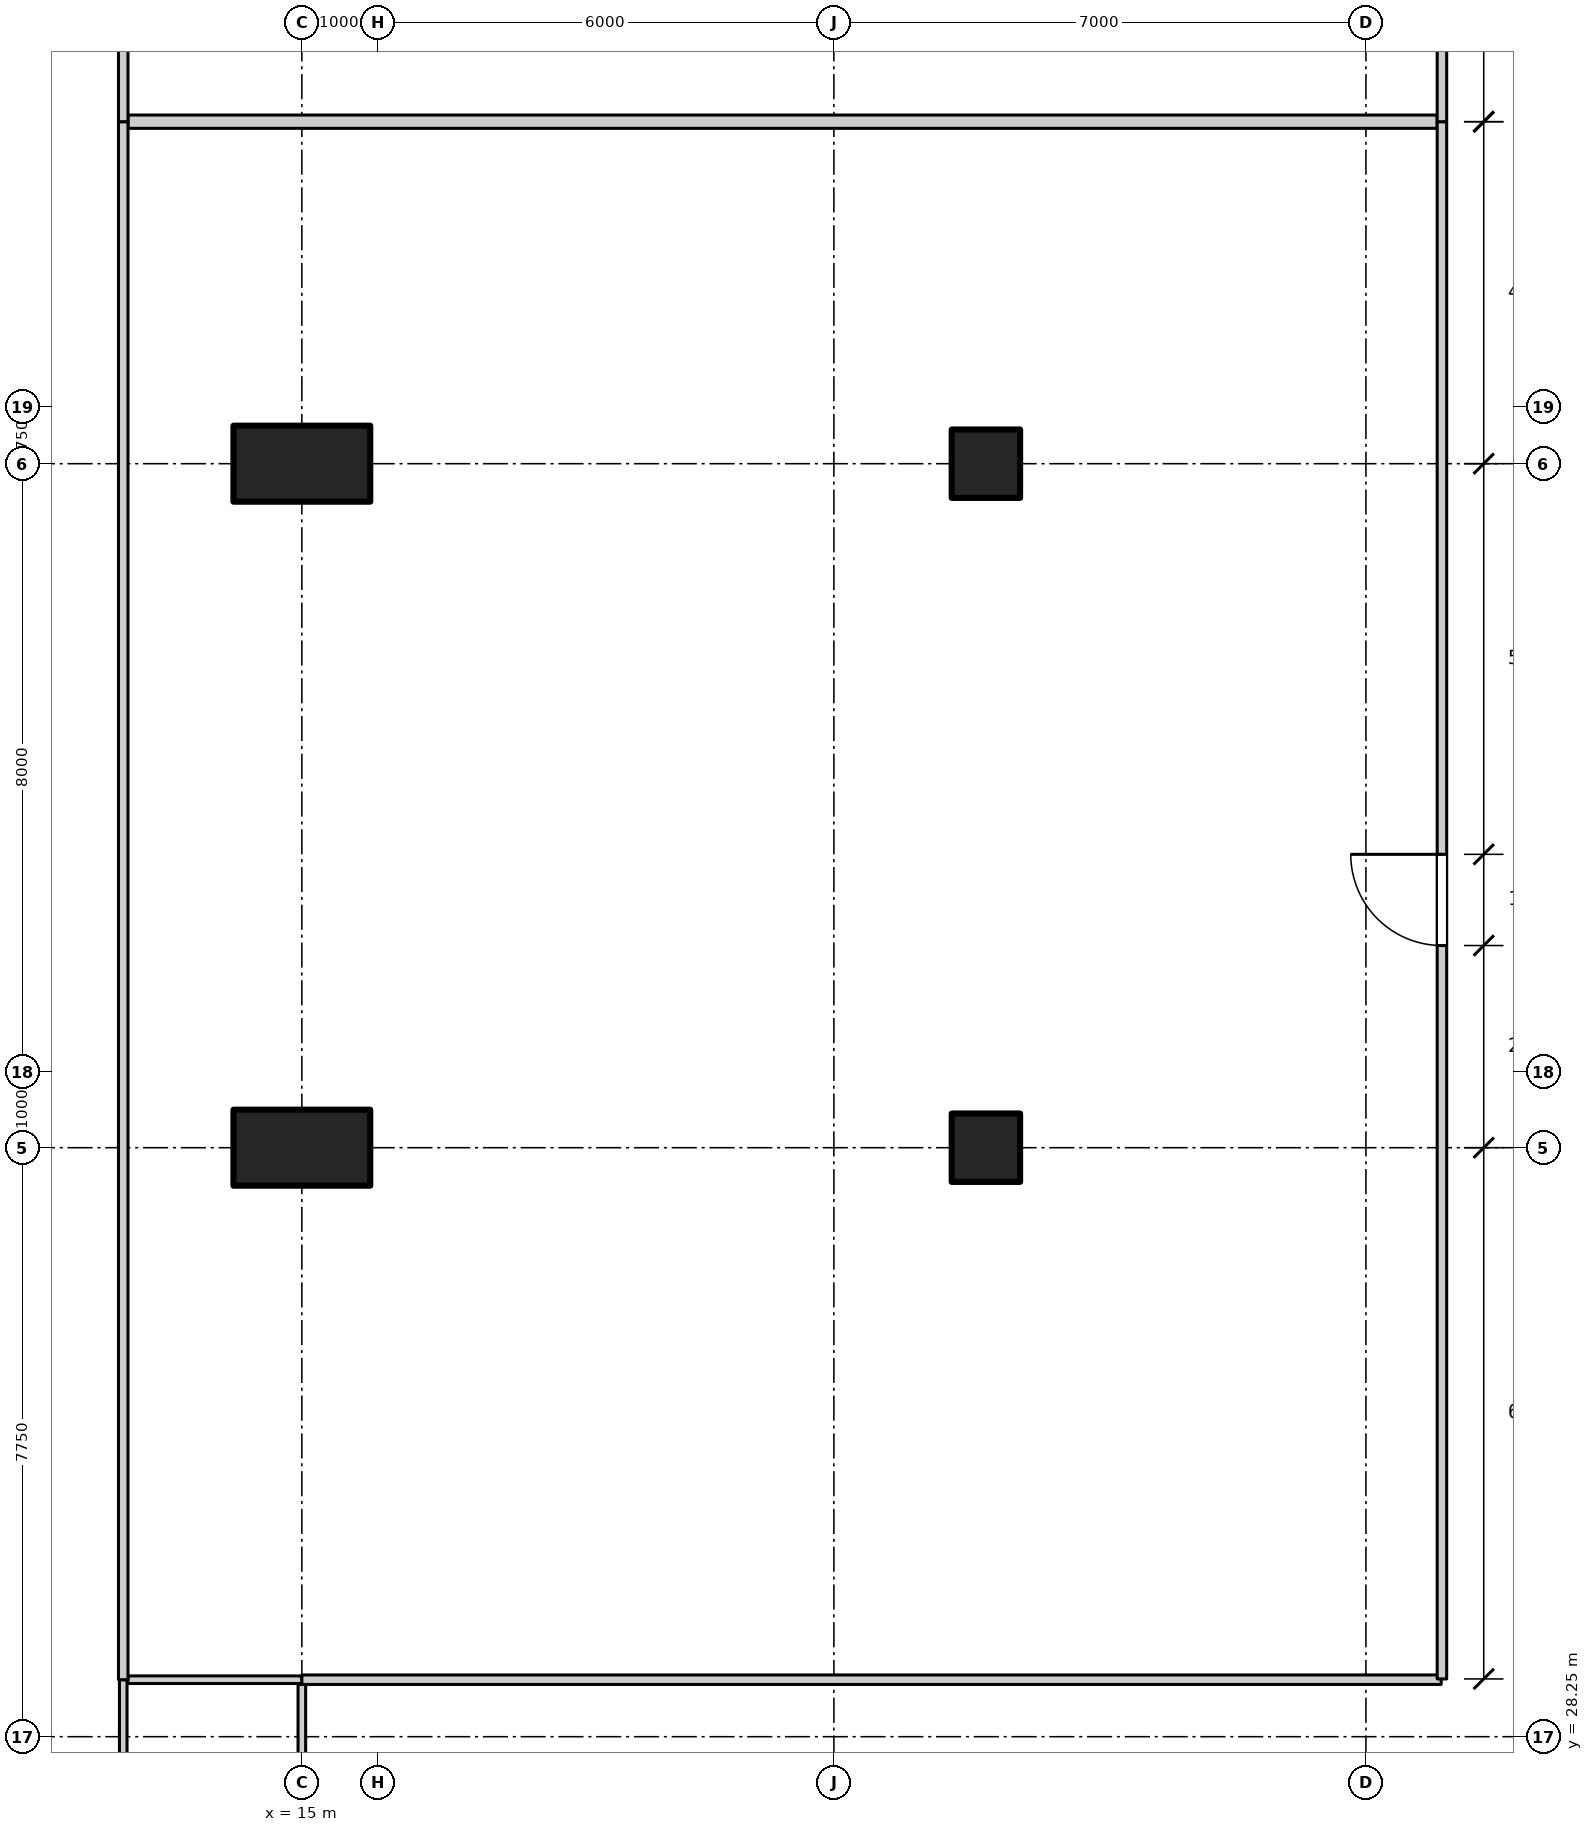
"""IFC4 building model, lengths in metres.
Left out: names, types, materials, properties, quantities, classifications, styles, units other than length and angle.
Written with IfcOpenShell. Run it as: python <this file> out.ifc"""

import sys

from ifc_helpers import new_model, si_unit, direction, frame, frame_2d, origin, origin_2d, place, context, subcontext, project, spatial, rectangle, extrude, element, fill, save


model = new_model("IFC4")
c1 = context("Model", 3, precision=1e-05, world=origin(), true_north=direction((0.0, 1.0)))
c2 = subcontext(c1, "Body", "Model", "MODEL_VIEW")
j1 = project(units=[si_unit("LENGTHUNIT", "METRE"), si_unit("PLANEANGLEUNIT", "RADIAN")], contexts=[c1])
p1 = place(None, origin())
s1 = spatial("IfcSite", under=j1, at=p1, CompositionType="ELEMENT")
p2 = place(p1, origin())
s2 = spatial("IfcBuilding", under=s1, at=p2, CompositionType="ELEMENT")
p3 = place(p2, frame((0.0, 0.0, -10.0)))
s3 = spatial("IfcBuildingStorey", under=s2, at=p3, CompositionType="ELEMENT", Elevation=-10.0)
for number, where, z_axis, x_axis in (
    (1, (24.0, 36.0, -1.4), (0.0, 0.0, 1.0), (1.0, 0.0, 0.0)),
    (2, (24.0, 45.0, -1.4), (0.0, 0.0, 1.0), (1.0, 0.0, 0.0)),
):
    element("IfcColumn", number, at=place(p3, frame(where, z_axis=z_axis, x_axis=x_axis)), inside=s3, PredefinedType="COLUMN", context=c2, shape_type="SweptSolid", body=[
        extrude(rectangle(XDim=0.9, YDim=0.9, at=origin_2d()), origin(), (0.0, 0.0, 1.0), 6.4),
    ])
for number, where, z_axis, x_axis in (
    (3, (15.0, 36.0, -1.4), (0.0, 0.0, 1.0), (1.0, 0.0, 0.0)),
    (4, (15.0, 45.0, -1.4), (0.0, 0.0, 1.0), (1.0, 0.0, 0.0)),
):
    element("IfcColumn", number, at=place(p3, frame(where, z_axis=z_axis, x_axis=x_axis)), inside=s3, PredefinedType="COLUMN", context=c2, shape_type="SweptSolid", body=[
        extrude(rectangle(XDim=1.8, YDim=1.0, at=origin_2d()), origin(), (0.0, 0.0, 1.0), 6.4),
    ])
p4 = place(p3, frame((12.712, 29.0, 0.0), z_axis=(0.0, 0.0, 1.0), x_axis=(1.0, 0.0, 0.0)))
e5 = element("IfcWall", 5, at=p4, inside=s3, PredefinedType="PARTITIONING", context=c2, shape_type="SweptSolid", body=[
    extrude(rectangle(XDim=2.288, YDim=0.1, at=frame_2d((1.144, 0.0))), origin(), (0.0, 0.0, 1.0), 4.75),
])
p5 = place(p3, frame((15.0, 29.0, 0.0), z_axis=(0.0, 0.0, 1.0), x_axis=(1.0, 0.0, 0.0)))
e6 = element("IfcWall", 6, at=p5, inside=s3, PredefinedType="PARTITIONING", context=c2, shape_type="SweptSolid", body=[
    extrude(rectangle(XDim=14.99, YDim=0.125, at=frame_2d((7.495, 0.0))), origin(), (0.0, 0.0, 1.0), 4.75),
])
p6 = place(p3, frame((12.712, 49.5, 0.0), z_axis=(0.0, 0.0, 1.0), x_axis=(1.0, 0.0, 0.0)))
e7 = element("IfcWall", 7, at=p6, inside=s3, PredefinedType="PARTITIONING", context=c2, shape_type="SweptSolid", body=[
    extrude(rectangle(XDim=17.225, YDim=0.175, at=frame_2d((8.613, 0.0))), origin(), (0.0, 0.0, 1.0), 4.75),
])
p7 = place(p3, frame((12.65, 27.05, 0.0), z_axis=(0.0, 0.0, 1.0), x_axis=(0.0, 1.0, 0.0)))
e8 = element("IfcWall", 8, at=p7, inside=s3, PredefinedType="PARTITIONING", context=c2, shape_type="SweptSolid", body=[
    extrude(rectangle(XDim=1.95, YDim=0.1, at=frame_2d((0.975, 0.0))), origin(), (0.0, 0.0, 1.0), 4.75),
])
p8 = place(p3, frame((12.65, 29.0, 0.0), z_axis=(0.0, 0.0, 1.0), x_axis=(0.0, 1.0, 0.0)))
e9 = element("IfcWall", 9, at=p8, inside=s3, PredefinedType="PARTITIONING", context=c2, shape_type="SweptSolid", body=[
    extrude(rectangle(XDim=20.5, YDim=0.125, at=frame_2d((10.25, 0.0))), origin(), (0.0, 0.0, 1.0), 4.75),
])
p9 = place(p3, frame((12.65, 49.5, 0.0), z_axis=(0.0, 0.0, 1.0), x_axis=(0.0, 1.0, 0.0)))
e10 = element("IfcWall", 10, at=p9, inside=s3, PredefinedType="PARTITIONING", context=c2, shape_type="SweptSolid", body=[
    extrude(rectangle(XDim=18.0, YDim=0.125, at=frame_2d((9.0, 0.0))), origin(), (0.0, 0.0, 1.0), 4.75),
])
p10 = place(p3, frame((15.0, 27.95, 0.0), z_axis=(0.0, 0.0, 1.0), x_axis=(0.0, 1.0, 0.0)))
e11 = element("IfcWall", 11, at=p10, inside=s3, PredefinedType="PARTITIONING", context=c2, shape_type="SweptSolid", body=[
    extrude(rectangle(XDim=0.988, YDim=0.1, at=frame_2d((0.494, 0.0))), origin(), (0.0, 0.0, 1.0), 4.75),
])
p11 = place(p3, frame((30.0, 29.01, 0.0), z_axis=(0.0, 0.0, 1.0), x_axis=(0.0, 1.0, 0.0)))
e12 = element("IfcWall", 12, at=p11, inside=s3, PredefinedType="PARTITIONING", context=c2, shape_type="SweptSolid", body=[
    extrude(rectangle(XDim=20.49, YDim=0.125, at=frame_2d((10.245, 0.0))), origin(), (0.0, 0.0, 1.0), 4.75),
])
p12 = place(p11, frame((9.65, 0.0, 0.0)))
e13 = element("IfcOpeningElement", 13, at=p12, cuts=e12, PredefinedType="OPENING", context=c2, shape_type="SweptSolid", body=[
    extrude(rectangle(XDim=1.2, YDim=2.1, at=frame_2d((0.6, 1.05))), frame((0.0, 0.073, 0.0), z_axis=(0.0, -1.0, 0.0), x_axis=(1.0, 0.0, 0.0)), (0.0, 0.0, 1.0), 0.145),
])
p13 = place(p3, frame((30.0, 49.5, 0.0), z_axis=(0.0, 0.0, 1.0), x_axis=(0.0, 1.0, 0.0)))
e14 = element("IfcWall", 14, at=p13, inside=s3, PredefinedType="PARTITIONING", context=c2, shape_type="SweptSolid", body=[
    extrude(rectangle(XDim=18.0, YDim=0.125, at=frame_2d((9.0, 0.0))), origin(), (0.0, 0.0, 1.0), 4.75),
])
p14 = place(p13, frame((8.4, 0.0, 0.0)))
e15 = element("IfcOpeningElement", 15, at=p14, cuts=e14, PredefinedType="OPENING", context=c2, shape_type="SweptSolid", body=[
    extrude(rectangle(XDim=1.2, YDim=2.1, at=frame_2d((0.6, 1.05))), frame((0.0, 0.073, 0.0), z_axis=(0.0, -1.0, 0.0), x_axis=(1.0, 0.0, 0.0)), (0.0, 0.0, 1.0), 0.145),
])
p15 = place(p12, origin())
e16 = element("IfcDoor", 16, at=p15, inside=s3, OperationType="SINGLE_SWING_RIGHT", PredefinedType="DOOR", context=c2, shape_type="SweptSolid", body=[
    extrude(rectangle(XDim=1.2, YDim=2.1, at=frame_2d((0.6, 1.05))), frame((0.0, 0.025, 0.0), z_axis=(0.0, -1.0, 0.0), x_axis=(1.0, 0.0, 0.0)), (0.0, 0.0, 1.0), 0.05),
])
fill(e13, e16)
save(model, sys.argv[1])
